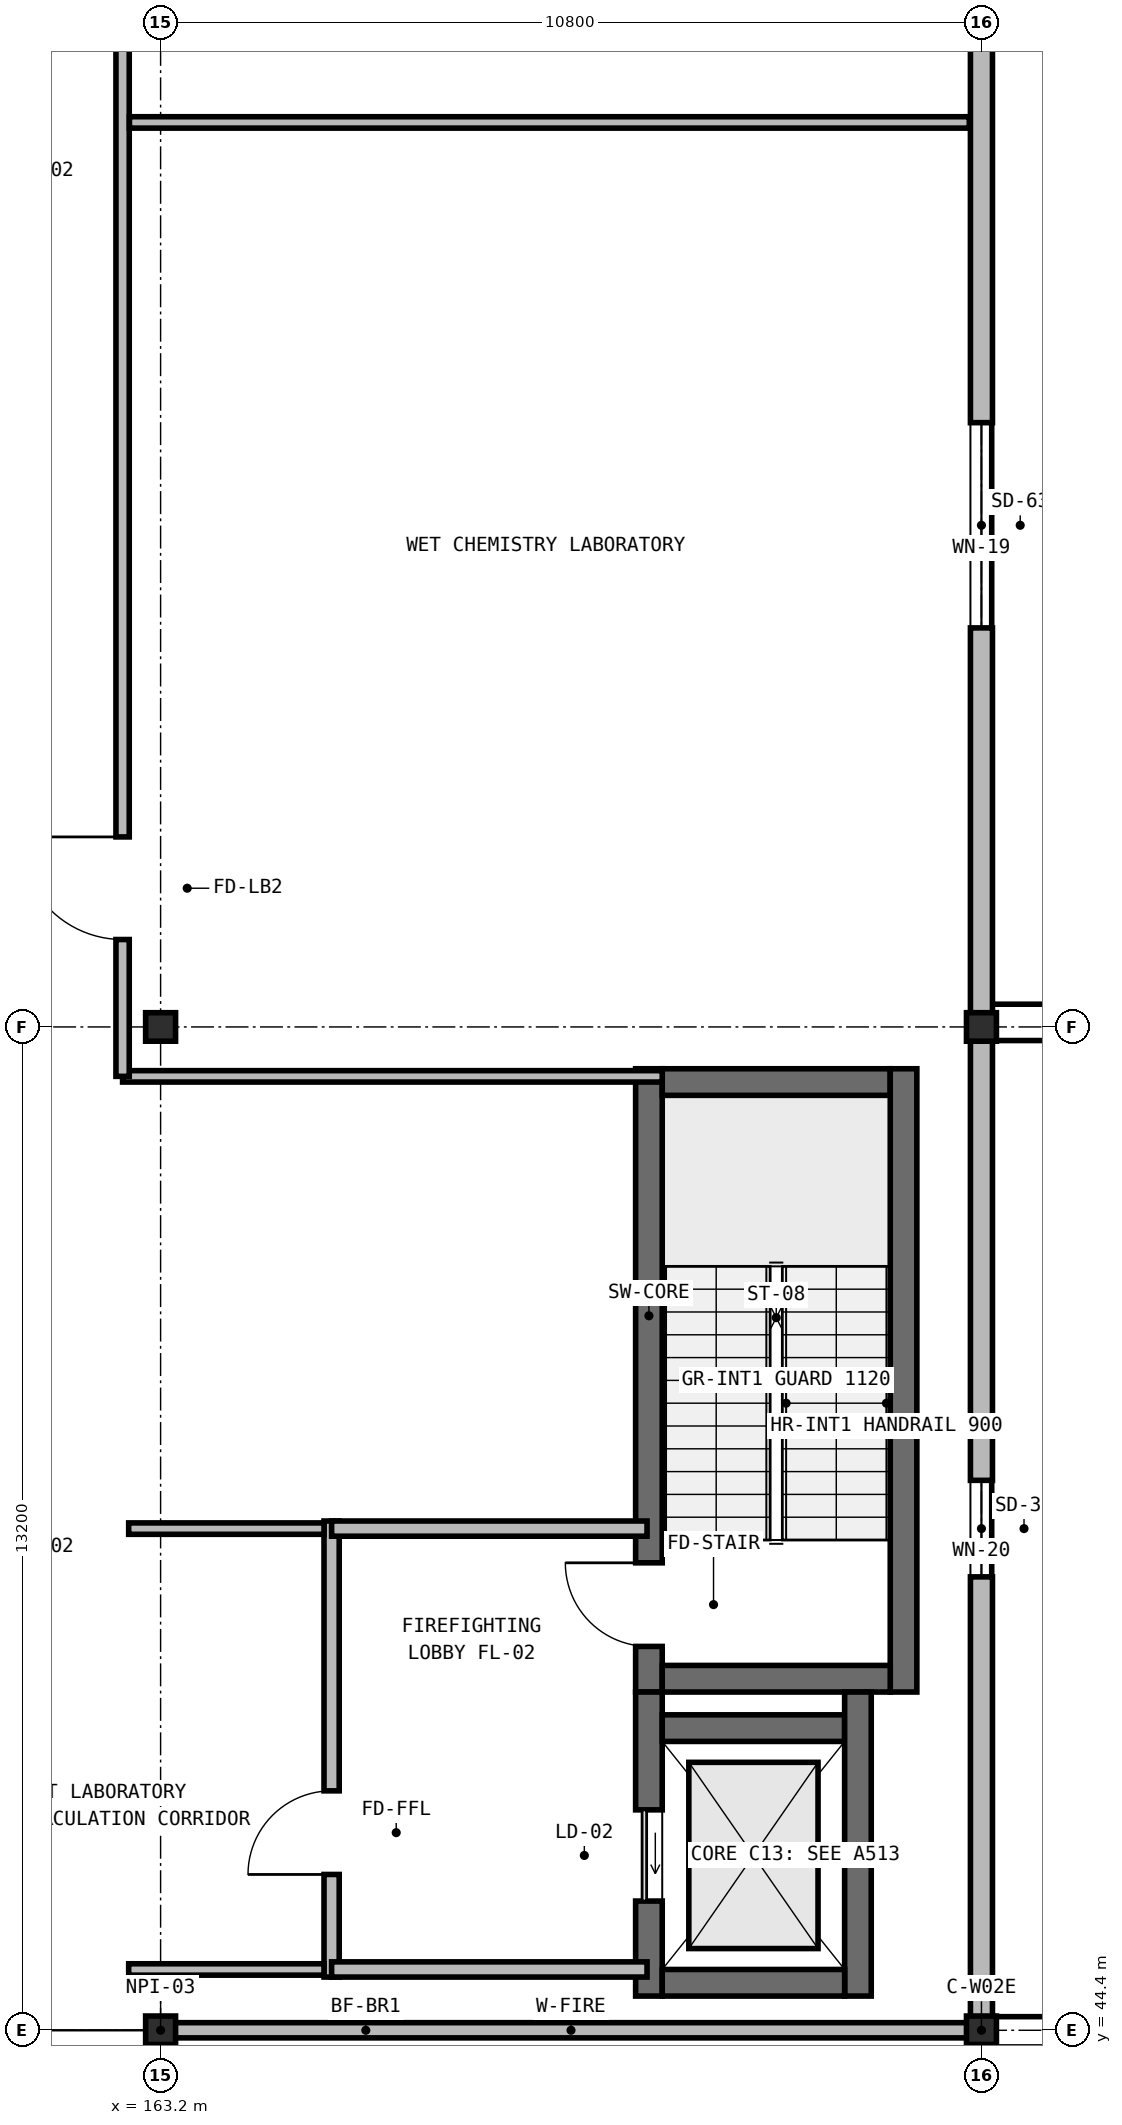
"""IFC4 building model, lengths in metres.
Left out: names, types, materials, properties, quantities, classifications, styles, units other than length and angle.
Written with IfcOpenShell. Run it as: python <this file> out.ifc"""

import sys

from ifc_helpers import new_model, si_unit, direction, frame, frame_2d, origin, origin_2d, place, context, subcontext, project, spatial, rectangle, i_section, extrude, element, fill, save


model = new_model("IFC4")
c1 = context("Model", 3, precision=1e-05, world=origin(), true_north=direction((0.0, 1.0)))
c2 = subcontext(c1, "Body", "Model", "MODEL_VIEW")
j1 = project(units=[si_unit("LENGTHUNIT", "METRE"), si_unit("PLANEANGLEUNIT", "RADIAN")], contexts=[c1])
p1 = place(None, origin())
s1 = spatial("IfcSite", under=j1, at=p1, CompositionType="ELEMENT")
p2 = place(p1, origin())
s2 = spatial("IfcBuilding", under=s1, at=p2, CompositionType="ELEMENT")
p3 = place(p2, frame((0.0, 0.0, 14.35)))
s3 = spatial("IfcBuildingStorey", under=s2, at=p3, CompositionType="ELEMENT", Elevation=14.35)
p4 = place(p3, frame((169.625, 48.85, 0.0), z_axis=(0.0, 0.0, 1.0), x_axis=(0.0, 1.0, 0.0)))
e1 = element("IfcWall", 1, at=p4, inside=s3, PredefinedType="SHEAR", context=c2, shape_type="SweptSolid", body=[
    extrude(rectangle(XDim=8.2, YDim=0.35, at=frame_2d((4.1, 0.0))), origin(), (0.0, 0.0, 1.0), 4.55),
])
p5 = place(p4, frame((0.6, 0.0, 0.0)))
e2 = element("IfcOpeningElement", 2, at=p5, cuts=e1, PredefinedType="OPENING", context=c2, shape_type="SweptSolid", body=[
    extrude(rectangle(XDim=1.1, YDim=2.15, at=frame_2d((0.55, 1.075))), frame((0.0, 0.185, 0.0), z_axis=(0.0, -1.0, 0.0), x_axis=(1.0, 0.0, 0.0)), (0.0, 0.0, 1.0), 0.37),
])
p6 = place(p3, frame((169.8, 56.875, 0.0), z_axis=(0.0, 0.0, 1.0), x_axis=(1.0, 0.0, 0.0)))
e3 = element("IfcWall", 3, at=p6, inside=s3, PredefinedType="SHEAR", context=c2, shape_type="SweptSolid", body=[
    extrude(rectangle(XDim=3.0, YDim=0.35, at=frame_2d((1.5, 0.0))), origin(), (0.0, 0.0, 1.0), 4.55),
])
p7 = place(p3, frame((172.975, 57.05, 0.0), z_axis=(0.0, 0.0, 1.0), x_axis=(0.0, -1.0, 0.0)))
e4 = element("IfcWall", 4, at=p7, inside=s3, PredefinedType="SHEAR", context=c2, shape_type="SweptSolid", body=[
    extrude(rectangle(XDim=8.2, YDim=0.35, at=frame_2d((4.1, 0.0))), origin(), (0.0, 0.0, 1.0), 4.55),
])
p8 = place(p3, frame((172.8, 49.025, 0.0), z_axis=(0.0, 0.0, 1.0), x_axis=(-1.0, 0.0, 0.0)))
e5 = element("IfcWall", 5, at=p8, inside=s3, PredefinedType="SHEAR", context=c2, shape_type="SweptSolid", body=[
    extrude(rectangle(XDim=3.0, YDim=0.35, at=frame_2d((1.5, 0.0))), origin(), (0.0, 0.0, 1.0), 4.55),
])
p9 = place(p3, frame((169.625, 44.85, 0.0), z_axis=(0.0, 0.0, 1.0), x_axis=(0.0, 1.0, 0.0)))
e6 = element("IfcWall", 6, at=p9, inside=s3, PredefinedType="SHEAR", context=c2, shape_type="SweptSolid", body=[
    extrude(rectangle(XDim=4.0, YDim=0.35, at=frame_2d((2.0, 0.0))), origin(), (0.0, 0.0, 1.0), 4.55),
])
p10 = place(p9, frame((1.25, 0.0, 0.0)))
e7 = element("IfcOpeningElement", 7, at=p10, cuts=e6, PredefinedType="OPENING", context=c2, shape_type="SweptSolid", body=[
    extrude(rectangle(XDim=1.2, YDim=2.15, at=frame_2d((0.6, 1.075))), frame((0.0, 0.185, 0.0), z_axis=(0.0, -1.0, 0.0), x_axis=(1.0, 0.0, 0.0)), (0.0, 0.0, 1.0), 0.37),
])
p11 = place(p3, frame((169.8, 48.375, 0.0), z_axis=(0.0, 0.0, 1.0), x_axis=(1.0, 0.0, 0.0)))
e8 = element("IfcWall", 8, at=p11, inside=s3, PredefinedType="SHEAR", context=c2, shape_type="SweptSolid", body=[
    extrude(rectangle(XDim=2.4, YDim=0.35, at=frame_2d((1.2, 0.0))), origin(), (0.0, 0.0, 1.0), 4.55),
])
p12 = place(p3, frame((172.375, 48.85, 0.0), z_axis=(0.0, 0.0, 1.0), x_axis=(0.0, -1.0, 0.0)))
e9 = element("IfcWall", 9, at=p12, inside=s3, PredefinedType="SHEAR", context=c2, shape_type="SweptSolid", body=[
    extrude(rectangle(XDim=4.0, YDim=0.35, at=frame_2d((2.0, 0.0))), origin(), (0.0, 0.0, 1.0), 4.55),
])
p13 = place(p3, frame((172.2, 45.025, 0.0), z_axis=(0.0, 0.0, 1.0), x_axis=(-1.0, 0.0, 0.0)))
e10 = element("IfcWall", 10, at=p13, inside=s3, PredefinedType="SHEAR", context=c2, shape_type="SweptSolid", body=[
    extrude(rectangle(XDim=2.4, YDim=0.35, at=frame_2d((1.2, 0.0))), origin(), (0.0, 0.0, 1.0), 4.55),
])
for number, where, z_axis, x_axis in (
    (11, (163.2, 44.4, 0.0), (0.0, 0.0, 1.0), (1.0, 0.0, 0.0)),
    (12, (163.2, 57.6, 0.0), (0.0, 0.0, 1.0), (1.0, 0.0, 0.0)),
    (13, (174.0, 44.4, 0.0), (0.0, 0.0, 1.0), (1.0, 0.0, 0.0)),
    (14, (174.0, 57.6, 0.0), (0.0, 0.0, 1.0), (1.0, 0.0, 0.0)),
):
    element("IfcColumn", number, at=place(p3, frame(where, z_axis=z_axis, x_axis=x_axis)), inside=s3, PredefinedType="COLUMN", context=c2, shape_type="SweptSolid", body=[
        extrude(i_section(OverallWidth=0.394, OverallDepth=0.375, WebThickness=0.02, FlangeThickness=0.032, at=origin_2d()), origin(), (0.0, 0.0, 1.0), 4.55),
    ])
p14 = place(p3, frame((174.0, 70.796, 0.0), z_axis=(0.0, 0.0, 1.0), x_axis=(0.0, -1.0, 0.0)))
e15 = element("IfcWall", 15, at=p14, inside=s3, PredefinedType="SOLIDWALL", context=c2, shape_type="SweptSolid", body=[
    extrude(rectangle(XDim=13.192, YDim=0.29, at=frame_2d((6.596, 0.0))), origin(), (0.0, 0.0, 1.0), 3.816),
])
p15 = place(p14, frame((5.246, 0.0, 0.95)))
e16 = element("IfcOpeningElement", 16, at=p15, cuts=e15, PredefinedType="OPENING", context=c2, shape_type="SweptSolid", body=[
    extrude(rectangle(XDim=2.7, YDim=1.4, at=frame_2d((1.35, 0.7))), frame((0.0, 0.155, 0.0), z_axis=(0.0, -1.0, 0.0), x_axis=(1.0, 0.0, 0.0)), (0.0, 0.0, 1.0), 0.31),
])
p16 = place(p3, frame((174.0, 57.596, 0.0), z_axis=(0.0, 0.0, 1.0), x_axis=(0.0, -1.0, 0.0)))
e17 = element("IfcWall", 17, at=p16, inside=s3, PredefinedType="SOLIDWALL", context=c2, shape_type="SweptSolid", body=[
    extrude(rectangle(XDim=13.192, YDim=0.29, at=frame_2d((6.596, 0.0))), origin(), (0.0, 0.0, 1.0), 3.816),
])
p17 = place(p16, frame((5.961, 0.0, 0.95)))
e18 = element("IfcOpeningElement", 18, at=p17, cuts=e17, PredefinedType="OPENING", context=c2, shape_type="SweptSolid", body=[
    extrude(rectangle(XDim=1.27, YDim=1.8, at=frame_2d((0.635, 0.9))), frame((0.0, 0.155, 0.0), z_axis=(0.0, -1.0, 0.0), x_axis=(1.0, 0.0, 0.0)), (0.0, 0.0, 1.0), 0.31),
])
p18 = place(p3, frame((174.0, 44.396, 0.0), z_axis=(0.0, 0.0, 1.0), x_axis=(0.0, -1.0, 0.0)))
e19 = element("IfcWall", 19, at=p18, inside=s3, PredefinedType="SOLIDWALL", context=c2, shape_type="SweptSolid", body=[
    extrude(rectangle(XDim=9.592, YDim=0.29, at=frame_2d((4.796, 0.0))), origin(), (0.0, 0.0, 1.0), 3.884),
])
p19 = place(p18, frame((3.996, 0.0, 0.95)))
e20 = element("IfcOpeningElement", 20, at=p19, cuts=e19, PredefinedType="OPENING", context=c2, shape_type="SweptSolid", body=[
    extrude(rectangle(XDim=1.6, YDim=1.72, at=frame_2d((0.8, 0.86))), frame((0.0, 0.155, 0.0), z_axis=(0.0, -1.0, 0.0), x_axis=(1.0, 0.0, 0.0)), (0.0, 0.0, 1.0), 0.31),
])
p20 = place(p3, frame((163.36, 44.4, 0.0), z_axis=(0.0, 0.0, 1.0), x_axis=(1.0, 0.0, 0.0)))
e21 = element("IfcWall", 21, at=p20, inside=s3, PredefinedType="SOLIDWALL", context=c2, shape_type="SweptSolid", body=[
    extrude(rectangle(XDim=10.48, YDim=0.2, at=frame_2d((5.24, 0.0))), origin(), (0.0, 0.0, 1.0), 3.738),
])
p21 = place(p3, frame((165.45, 45.1, 0.0), z_axis=(0.0, 0.0, 1.0), x_axis=(0.0, 1.0, 0.0)))
e22 = element("IfcWall", 22, at=p21, inside=s3, PredefinedType="SOLIDWALL", context=c2, shape_type="SweptSolid", body=[
    extrude(rectangle(XDim=6.0, YDim=0.2, at=frame_2d((3.0, 0.0))), origin(), (0.0, 0.0, 1.0), 4.3),
])
p22 = place(p21, frame((1.35, 0.0, 0.0)))
e23 = element("IfcOpeningElement", 23, at=p22, cuts=e22, PredefinedType="OPENING", context=c2, shape_type="SweptSolid", body=[
    extrude(rectangle(XDim=1.1, YDim=2.15, at=frame_2d((0.55, 1.075))), frame((0.0, 0.11, 0.0), z_axis=(0.0, -1.0, 0.0), x_axis=(1.0, 0.0, 0.0)), (0.0, 0.0, 1.0), 0.22),
])
for number, where, z_axis, x_axis in (
    (24, (165.45, 45.2, 0.0), (0.0, 0.0, 1.0), (1.0, 0.0, 0.0)),
    (25, (165.45, 51.0, 0.0), (0.0, 0.0, 1.0), (1.0, 0.0, 0.0)),
):
    element("IfcWall", number, at=place(p3, frame(where, z_axis=z_axis, x_axis=x_axis)), inside=s3, PredefinedType="SOLIDWALL", context=c2, shape_type="SweptSolid", body=[
        extrude(rectangle(XDim=4.15, YDim=0.2, at=frame_2d((2.075, 0.0))), origin(), (0.0, 0.0, 1.0), 4.3),
    ])
p23 = place(p3, frame((162.7, 56.95, 0.0), z_axis=(0.0, 0.0, 1.0), x_axis=(1.0, 0.0, 0.0)))
e26 = element("IfcWall", 26, at=p23, inside=s3, PredefinedType="PARTITIONING", context=c2, shape_type="SweptSolid", body=[
    extrude(rectangle(XDim=7.1, YDim=0.15, at=frame_2d((3.55, 0.0))), origin(), (0.0, 0.0, 1.0), 4.3),
])
p24 = place(p3, frame((162.7, 56.95, 0.0), z_axis=(0.0, 0.0, 1.0), x_axis=(0.0, 1.0, 0.0)))
e27 = element("IfcWall", 27, at=p24, inside=s3, PredefinedType="PARTITIONING", context=c2, shape_type="SweptSolid", body=[
    extrude(rectangle(XDim=17.8, YDim=0.175, at=frame_2d((8.9, 0.0))), origin(), (0.0, 0.0, 1.0), 4.3),
])
p25 = place(p24, frame((1.8, 0.0, 0.0)))
e28 = element("IfcOpeningElement", 28, at=p25, cuts=e27, PredefinedType="OPENING", context=c2, shape_type="SweptSolid", body=[
    extrude(rectangle(XDim=1.35, YDim=2.2, at=frame_2d((0.675, 1.1))), frame((0.0, 0.097, 0.0), z_axis=(0.0, -1.0, 0.0), x_axis=(1.0, 0.0, 0.0)), (0.0, 0.0, 1.0), 0.195),
])
p26 = place(p24, frame((14.65, 0.0, 0.0)))
e29 = element("IfcOpeningElement", 29, at=p26, cuts=e27, PredefinedType="OPENING", context=c2, shape_type="SweptSolid", body=[
    extrude(rectangle(XDim=1.35, YDim=2.2, at=frame_2d((0.675, 1.1))), frame((0.0, 0.097, 0.0), z_axis=(0.0, -1.0, 0.0), x_axis=(1.0, 0.0, 0.0)), (0.0, 0.0, 1.0), 0.195),
])
p27 = place(p3, frame((162.79, 69.5, 0.0), z_axis=(0.0, 0.0, 1.0), x_axis=(1.0, 0.0, 0.0)))
e30 = element("IfcWall", 30, at=p27, inside=s3, PredefinedType="PARTITIONING", context=c2, shape_type="SweptSolid", body=[
    extrude(rectangle(XDim=11.05, YDim=0.15, at=frame_2d((5.525, 0.0))), origin(), (0.0, 0.0, 1.0), 4.3),
])
for number, where, z_axis, x_axis in (
    (31, (162.78, 45.2, 0.0), (0.0, 0.0, 1.0), (1.0, 0.0, 0.0)),
    (32, (162.78, 51.0, 0.0), (0.0, 0.0, 1.0), (1.0, 0.0, 0.0)),
):
    element("IfcWall", number, at=place(p3, frame(where, z_axis=z_axis, x_axis=x_axis)), inside=s3, PredefinedType="PARTITIONING", context=c2, shape_type="SweptSolid", body=[
        extrude(rectangle(XDim=2.57, YDim=0.15, at=frame_2d((1.285, 0.0))), origin(), (0.0, 0.0, 1.0), 4.3),
    ])
p28 = place(p15, origin())
e33 = element("IfcWindow", 33, at=p28, inside=s3, PartitioningType="SINGLE_PANEL", PredefinedType="WINDOW", context=c2, shape_type="SweptSolid", body=[
    extrude(rectangle(XDim=2.7, YDim=1.4, at=frame_2d((1.35, 0.7))), frame((0.0, 0.03, 0.0), z_axis=(0.0, -1.0, 0.0), x_axis=(1.0, 0.0, 0.0)), (0.0, 0.0, 1.0), 0.06),
])
fill(e16, e33)
p29 = place(p17, origin())
e34 = element("IfcWindow", 34, at=p29, inside=s3, PartitioningType="SINGLE_PANEL", PredefinedType="WINDOW", context=c2, shape_type="SweptSolid", body=[
    extrude(rectangle(XDim=1.27, YDim=1.8, at=frame_2d((0.635, 0.9))), frame((0.0, 0.03, 0.0), z_axis=(0.0, -1.0, 0.0), x_axis=(1.0, 0.0, 0.0)), (0.0, 0.0, 1.0), 0.06),
])
fill(e18, e34)
p30 = place(p5, origin())
e35 = element("IfcDoor", 35, at=p30, inside=s3, OperationType="SINGLE_SWING_RIGHT", PredefinedType="DOOR", context=c2, shape_type="SweptSolid", body=[
    extrude(rectangle(XDim=1.1, YDim=2.15, at=frame_2d((0.55, 1.075))), frame((0.0, 0.025, 0.0), z_axis=(0.0, -1.0, 0.0), x_axis=(1.0, 0.0, 0.0)), (0.0, 0.0, 1.0), 0.05),
])
fill(e2, e35)
p31 = place(p10, origin())
e36 = element("IfcDoor", 36, at=p31, inside=s3, OperationType="SLIDING_TO_LEFT", PredefinedType="USERDEFINED", context=c2, shape_type="SweptSolid", body=[
    extrude(rectangle(XDim=1.2, YDim=2.15, at=frame_2d((0.6, 1.075))), frame((0.0, 0.025, 0.0), z_axis=(0.0, -1.0, 0.0), x_axis=(1.0, 0.0, 0.0)), (0.0, 0.0, 1.0), 0.05),
])
fill(e7, e36)
p32 = place(p22, origin())
e37 = element("IfcDoor", 37, at=p32, inside=s3, OperationType="SINGLE_SWING_LEFT", PredefinedType="DOOR", context=c2, shape_type="SweptSolid", body=[
    extrude(rectangle(XDim=1.1, YDim=2.15, at=frame_2d((0.55, 1.075))), frame((0.0, 0.025, 0.0), z_axis=(0.0, -1.0, 0.0), x_axis=(1.0, 0.0, 0.0)), (0.0, 0.0, 1.0), 0.05),
])
fill(e23, e37)
p33 = place(p25, origin())
e38 = element("IfcDoor", 38, at=p33, inside=s3, OperationType="SINGLE_SWING_RIGHT", PredefinedType="DOOR", context=c2, shape_type="SweptSolid", body=[
    extrude(rectangle(XDim=1.35, YDim=2.2, at=frame_2d((0.675, 1.1))), frame((0.0, 0.025, 0.0), z_axis=(0.0, -1.0, 0.0), x_axis=(1.0, 0.0, 0.0)), (0.0, 0.0, 1.0), 0.05),
])
fill(e28, e38)
save(model, sys.argv[1])
